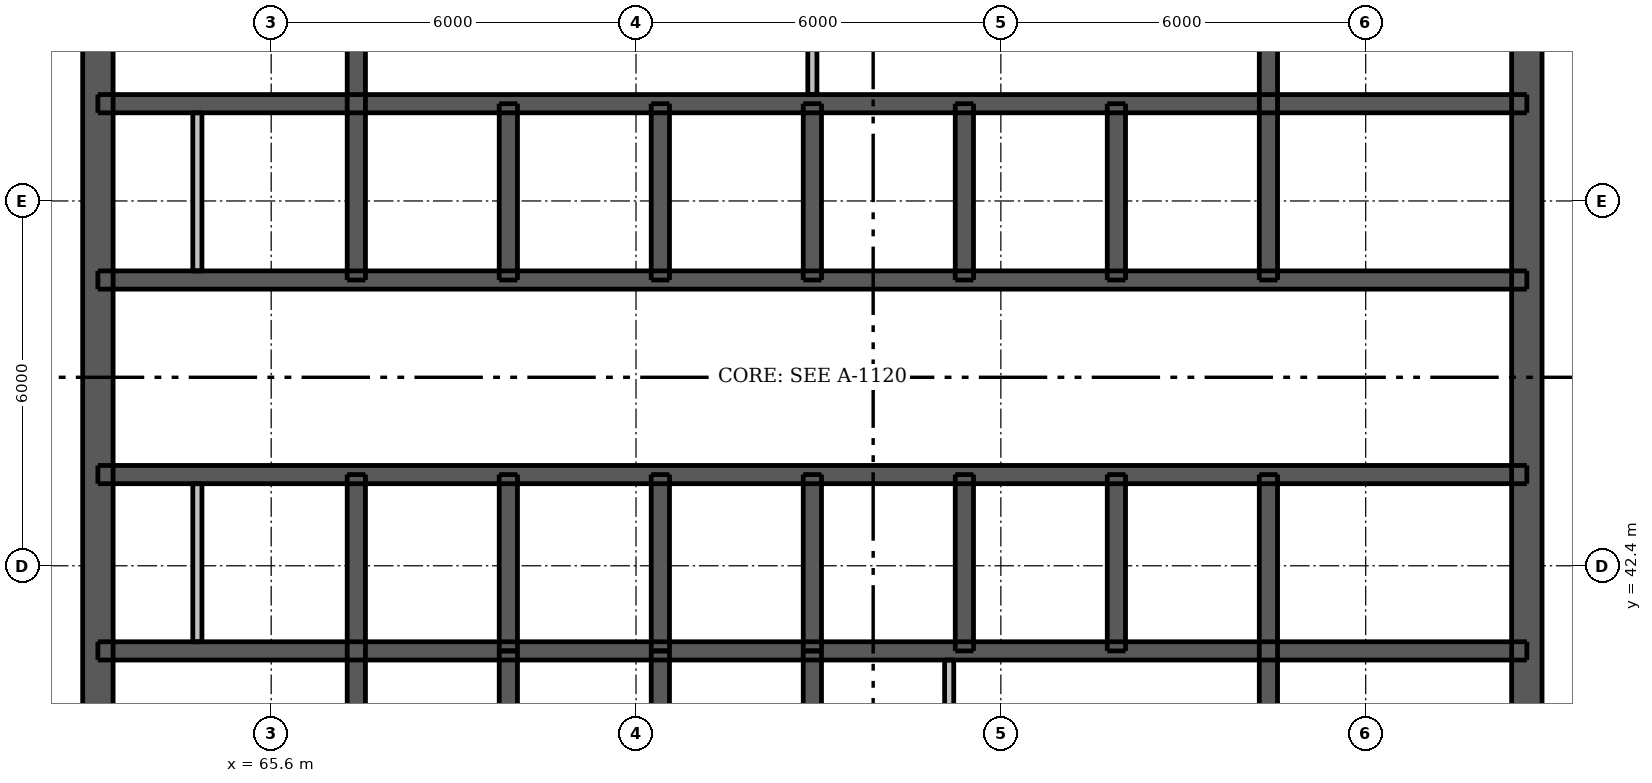
"""IFC4 building model, lengths in metres.
Left out: names, types, materials, properties, quantities, classifications, styles, units other than length and angle.
Written with IfcOpenShell. Run it as: python <this file> out.ifc"""

import sys

from ifc_helpers import new_model, si_unit, direction, frame, frame_2d, origin, place, context, subcontext, project, spatial, rectangle, extrude, element, fill, save


model = new_model("IFC4")
c1 = context("Model", 3, precision=1e-05, world=origin(), true_north=direction((0.0, 1.0)))
c2 = subcontext(c1, "Body", "Model", "MODEL_VIEW")
j1 = project(units=[si_unit("LENGTHUNIT", "METRE"), si_unit("PLANEANGLEUNIT", "RADIAN")], contexts=[c1])
p1 = place(None, origin())
s1 = spatial("IfcSite", under=j1, at=p1, CompositionType="ELEMENT")
p2 = place(p1, origin())
s2 = spatial("IfcBuilding", under=s1, at=p2, CompositionType="ELEMENT")
p3 = place(p2, frame((0.0, 0.0, 275.2)))
s3 = spatial("IfcBuildingStorey", under=s2, at=p3, CompositionType="ELEMENT", Elevation=275.2)
p4 = place(p3, frame((62.75, 33.5, 0.0), z_axis=(0.0, 0.0, 1.0), x_axis=(0.0, 1.0, 0.0)))
e1 = element("IfcWall", 1, at=p4, inside=s3, PredefinedType="SHEAR", context=c2, shape_type="SweptSolid", body=[
    extrude(rectangle(XDim=24.0, YDim=0.5, at=frame_2d((12.0, 0.0))), origin(), (0.0, 0.0, 1.0), 3.05),
])
p5 = place(p4, frame((11.2, 0.0, 0.0)))
e2 = element("IfcOpeningElement", 2, at=p5, cuts=e1, PredefinedType="OPENING", context=c2, shape_type="SweptSolid", body=[
    extrude(rectangle(XDim=1.6, YDim=2.1, at=frame_2d((0.8, 1.05))), frame((0.0, 0.26, 0.0), z_axis=(0.0, -1.0, 0.0), x_axis=(1.0, 0.0, 0.0)), (0.0, 0.0, 1.0), 0.52),
])
p6 = place(p3, frame((86.25, 33.5, 0.0), z_axis=(0.0, 0.0, 1.0), x_axis=(0.0, 1.0, 0.0)))
e3 = element("IfcWall", 3, at=p6, inside=s3, PredefinedType="SHEAR", context=c2, shape_type="SweptSolid", body=[
    extrude(rectangle(XDim=24.0, YDim=0.5, at=frame_2d((12.0, 0.0))), origin(), (0.0, 0.0, 1.0), 3.05),
])
p7 = place(p6, frame((11.2, 0.0, 0.0)))
e4 = element("IfcOpeningElement", 4, at=p7, cuts=e3, PredefinedType="OPENING", context=c2, shape_type="SweptSolid", body=[
    extrude(rectangle(XDim=1.6, YDim=2.1, at=frame_2d((0.8, 1.05))), frame((0.0, 0.26, 0.0), z_axis=(0.0, -1.0, 0.0), x_axis=(1.0, 0.0, 0.0)), (0.0, 0.0, 1.0), 0.52),
])
p8 = place(p3, frame((62.75, 41.0, 0.0), z_axis=(0.0, 0.0, 1.0), x_axis=(1.0, 0.0, 0.0)))
e5 = element("IfcWall", 5, at=p8, inside=s3, PredefinedType="SHEAR", context=c2, shape_type="SweptSolid", body=[
    extrude(rectangle(XDim=23.5, YDim=0.3, at=frame_2d((11.75, 0.0))), origin(), (0.0, 0.0, 1.0), 3.05),
])
p9 = place(p3, frame((62.75, 43.9, 0.0), z_axis=(0.0, 0.0, 1.0), x_axis=(1.0, 0.0, 0.0)))
e6 = element("IfcWall", 6, at=p9, inside=s3, PredefinedType="SHEAR", context=c2, shape_type="SweptSolid", body=[
    extrude(rectangle(XDim=23.5, YDim=0.3, at=frame_2d((11.75, 0.0))), origin(), (0.0, 0.0, 1.0), 3.05),
])
p10 = place(p9, frame((0.543, 0.0, 0.0)))
e7 = element("IfcOpeningElement", 7, at=p10, cuts=e6, PredefinedType="OPENING", context=c2, shape_type="SweptSolid", body=[
    extrude(rectangle(XDim=0.8, YDim=2.1, at=frame_2d((0.4, 1.05))), frame((0.0, 0.16, 0.0), z_axis=(0.0, -1.0, 0.0), x_axis=(1.0, 0.0, 0.0)), (0.0, 0.0, 1.0), 0.32),
])
p11 = place(p9, frame((2.418, 0.0, 0.0)))
e8 = element("IfcOpeningElement", 8, at=p11, cuts=e6, PredefinedType="OPENING", context=c2, shape_type="SweptSolid", body=[
    extrude(rectangle(XDim=0.9, YDim=2.1, at=frame_2d((0.45, 1.05))), frame((0.0, 0.16, 0.0), z_axis=(0.0, -1.0, 0.0), x_axis=(1.0, 0.0, 0.0)), (0.0, 0.0, 1.0), 0.32),
])
p12 = place(p9, frame((20.875, 0.0, 0.0)))
e9 = element("IfcOpeningElement", 9, at=p12, cuts=e6, PredefinedType="OPENING", context=c2, shape_type="SweptSolid", body=[
    extrude(rectangle(XDim=0.9, YDim=2.1, at=frame_2d((0.45, 1.05))), frame((0.0, 0.16, 0.0), z_axis=(0.0, -1.0, 0.0), x_axis=(1.0, 0.0, 0.0)), (0.0, 0.0, 1.0), 0.32),
])
p13 = place(p9, frame((5.05, 0.0, 0.0)))
e10 = element("IfcOpeningElement", 10, at=p13, cuts=e6, PredefinedType="OPENING", context=c2, shape_type="SweptSolid", body=[
    extrude(rectangle(XDim=0.9, YDim=2.1, at=frame_2d((0.45, 1.05))), frame((0.0, 0.16, 0.0), z_axis=(0.0, -1.0, 0.0), x_axis=(1.0, 0.0, 0.0)), (0.0, 0.0, 1.0), 0.32),
])
p14 = place(p9, frame((7.55, 0.0, 0.0)))
e11 = element("IfcOpeningElement", 11, at=p14, cuts=e6, PredefinedType="OPENING", context=c2, shape_type="SweptSolid", body=[
    extrude(rectangle(XDim=0.9, YDim=2.1, at=frame_2d((0.45, 1.05))), frame((0.0, 0.16, 0.0), z_axis=(0.0, -1.0, 0.0), x_axis=(1.0, 0.0, 0.0)), (0.0, 0.0, 1.0), 0.32),
])
p15 = place(p9, frame((12.55, 0.0, 0.0)))
e12 = element("IfcOpeningElement", 12, at=p15, cuts=e6, PredefinedType="OPENING", context=c2, shape_type="SweptSolid", body=[
    extrude(rectangle(XDim=0.9, YDim=2.1, at=frame_2d((0.45, 1.05))), frame((0.0, 0.16, 0.0), z_axis=(0.0, -1.0, 0.0), x_axis=(1.0, 0.0, 0.0)), (0.0, 0.0, 1.0), 0.32),
])
p16 = place(p9, frame((15.05, 0.0, 0.0)))
e13 = element("IfcOpeningElement", 13, at=p16, cuts=e6, PredefinedType="OPENING", context=c2, shape_type="SweptSolid", body=[
    extrude(rectangle(XDim=0.9, YDim=2.1, at=frame_2d((0.45, 1.05))), frame((0.0, 0.16, 0.0), z_axis=(0.0, -1.0, 0.0), x_axis=(1.0, 0.0, 0.0)), (0.0, 0.0, 1.0), 0.32),
])
p17 = place(p3, frame((62.75, 47.1, 0.0), z_axis=(0.0, 0.0, 1.0), x_axis=(1.0, 0.0, 0.0)))
e14 = element("IfcWall", 14, at=p17, inside=s3, PredefinedType="SHEAR", context=c2, shape_type="SweptSolid", body=[
    extrude(rectangle(XDim=23.5, YDim=0.3, at=frame_2d((11.75, 0.0))), origin(), (0.0, 0.0, 1.0), 3.05),
])
p18 = place(p17, frame((0.543, 0.0, 0.0)))
e15 = element("IfcOpeningElement", 15, at=p18, cuts=e14, PredefinedType="OPENING", context=c2, shape_type="SweptSolid", body=[
    extrude(rectangle(XDim=0.8, YDim=2.1, at=frame_2d((0.4, 1.05))), frame((0.0, 0.16, 0.0), z_axis=(0.0, -1.0, 0.0), x_axis=(1.0, 0.0, 0.0)), (0.0, 0.0, 1.0), 0.32),
])
p19 = place(p17, frame((2.418, 0.0, 0.0)))
e16 = element("IfcOpeningElement", 16, at=p19, cuts=e14, PredefinedType="OPENING", context=c2, shape_type="SweptSolid", body=[
    extrude(rectangle(XDim=0.9, YDim=2.1, at=frame_2d((0.45, 1.05))), frame((0.0, 0.16, 0.0), z_axis=(0.0, -1.0, 0.0), x_axis=(1.0, 0.0, 0.0)), (0.0, 0.0, 1.0), 0.32),
])
p20 = place(p17, frame((20.875, 0.0, 0.0)))
e17 = element("IfcOpeningElement", 17, at=p20, cuts=e14, PredefinedType="OPENING", context=c2, shape_type="SweptSolid", body=[
    extrude(rectangle(XDim=0.9, YDim=2.1, at=frame_2d((0.45, 1.05))), frame((0.0, 0.16, 0.0), z_axis=(0.0, -1.0, 0.0), x_axis=(1.0, 0.0, 0.0)), (0.0, 0.0, 1.0), 0.32),
])
p21 = place(p17, frame((4.95, 0.0, 0.0)))
e18 = element("IfcOpeningElement", 18, at=p21, cuts=e14, PredefinedType="OPENING", context=c2, shape_type="SweptSolid", body=[
    extrude(rectangle(XDim=1.1, YDim=2.1, at=frame_2d((0.55, 1.05))), frame((0.0, 0.16, 0.0), z_axis=(0.0, -1.0, 0.0), x_axis=(1.0, 0.0, 0.0)), (0.0, 0.0, 1.0), 0.32),
])
p22 = place(p17, frame((7.45, 0.0, 0.0)))
e19 = element("IfcOpeningElement", 19, at=p22, cuts=e14, PredefinedType="OPENING", context=c2, shape_type="SweptSolid", body=[
    extrude(rectangle(XDim=1.1, YDim=2.1, at=frame_2d((0.55, 1.05))), frame((0.0, 0.16, 0.0), z_axis=(0.0, -1.0, 0.0), x_axis=(1.0, 0.0, 0.0)), (0.0, 0.0, 1.0), 0.32),
])
p23 = place(p17, frame((9.95, 0.0, 0.0)))
e20 = element("IfcOpeningElement", 20, at=p23, cuts=e14, PredefinedType="OPENING", context=c2, shape_type="SweptSolid", body=[
    extrude(rectangle(XDim=1.1, YDim=2.1, at=frame_2d((0.55, 1.05))), frame((0.0, 0.16, 0.0), z_axis=(0.0, -1.0, 0.0), x_axis=(1.0, 0.0, 0.0)), (0.0, 0.0, 1.0), 0.32),
])
p24 = place(p17, frame((12.45, 0.0, 0.0)))
e21 = element("IfcOpeningElement", 21, at=p24, cuts=e14, PredefinedType="OPENING", context=c2, shape_type="SweptSolid", body=[
    extrude(rectangle(XDim=1.1, YDim=2.1, at=frame_2d((0.55, 1.05))), frame((0.0, 0.16, 0.0), z_axis=(0.0, -1.0, 0.0), x_axis=(1.0, 0.0, 0.0)), (0.0, 0.0, 1.0), 0.32),
])
p25 = place(p17, frame((14.95, 0.0, 0.0)))
e22 = element("IfcOpeningElement", 22, at=p25, cuts=e14, PredefinedType="OPENING", context=c2, shape_type="SweptSolid", body=[
    extrude(rectangle(XDim=1.1, YDim=2.1, at=frame_2d((0.55, 1.05))), frame((0.0, 0.16, 0.0), z_axis=(0.0, -1.0, 0.0), x_axis=(1.0, 0.0, 0.0)), (0.0, 0.0, 1.0), 0.32),
])
p26 = place(p17, frame((17.45, 0.0, 0.0)))
e23 = element("IfcOpeningElement", 23, at=p26, cuts=e14, PredefinedType="OPENING", context=c2, shape_type="SweptSolid", body=[
    extrude(rectangle(XDim=1.1, YDim=2.1, at=frame_2d((0.55, 1.05))), frame((0.0, 0.16, 0.0), z_axis=(0.0, -1.0, 0.0), x_axis=(1.0, 0.0, 0.0)), (0.0, 0.0, 1.0), 0.32),
])
p27 = place(p3, frame((62.75, 50.0, 0.0), z_axis=(0.0, 0.0, 1.0), x_axis=(1.0, 0.0, 0.0)))
e24 = element("IfcWall", 24, at=p27, inside=s3, PredefinedType="SHEAR", context=c2, shape_type="SweptSolid", body=[
    extrude(rectangle(XDim=23.5, YDim=0.3, at=frame_2d((11.75, 0.0))), origin(), (0.0, 0.0, 1.0), 3.05),
])
p28 = place(p3, frame((67.0, 33.75, 0.0), z_axis=(0.0, 0.0, 1.0), x_axis=(0.0, 1.0, 0.0)))
e25 = element("IfcWall", 25, at=p28, inside=s3, PredefinedType="SHEAR", context=c2, shape_type="SweptSolid", body=[
    extrude(rectangle(XDim=10.15, YDim=0.3, at=frame_2d((5.075, 0.0))), origin(), (0.0, 0.0, 1.0), 3.05),
])
p29 = place(p28, frame((0.45, 0.0, 0.0)))
e26 = element("IfcOpeningElement", 26, at=p29, cuts=e25, PredefinedType="OPENING", context=c2, shape_type="SweptSolid", body=[
    extrude(rectangle(XDim=1.1, YDim=2.1, at=frame_2d((0.55, 1.05))), frame((0.0, 0.16, 0.0), z_axis=(0.0, -1.0, 0.0), x_axis=(1.0, 0.0, 0.0)), (0.0, 0.0, 1.0), 0.32),
])
for number, where, z_axis, x_axis in (
    (27, (67.0, 47.1, 0.0), (0.0, 0.0, 1.0), (0.0, 1.0, 0.0)),
    (28, (82.0, 33.75, 0.0), (0.0, 0.0, 1.0), (0.0, 1.0, 0.0)),
    (29, (82.0, 47.1, 0.0), (0.0, 0.0, 1.0), (0.0, 1.0, 0.0)),
):
    element("IfcWall", number, at=place(p3, frame(where, z_axis=z_axis, x_axis=x_axis)), inside=s3, PredefinedType="SHEAR", context=c2, shape_type="SweptSolid", body=[
        extrude(rectangle(XDim=10.15, YDim=0.3, at=frame_2d((5.075, 0.0))), origin(), (0.0, 0.0, 1.0), 3.05),
    ])
for number, where, z_axis, x_axis in (
    (30, (69.5, 41.0, 0.0), (0.0, 0.0, 1.0), (0.0, 1.0, 0.0)),
    (31, (69.5, 47.1, 0.0), (0.0, 0.0, 1.0), (0.0, 1.0, 0.0)),
    (32, (72.0, 41.0, 0.0), (0.0, 0.0, 1.0), (0.0, 1.0, 0.0)),
    (33, (72.0, 47.1, 0.0), (0.0, 0.0, 1.0), (0.0, 1.0, 0.0)),
    (34, (74.5, 41.0, 0.0), (0.0, 0.0, 1.0), (0.0, 1.0, 0.0)),
    (35, (74.5, 47.1, 0.0), (0.0, 0.0, 1.0), (0.0, 1.0, 0.0)),
    (36, (77.0, 41.0, 0.0), (0.0, 0.0, 1.0), (0.0, 1.0, 0.0)),
    (37, (77.0, 47.1, 0.0), (0.0, 0.0, 1.0), (0.0, 1.0, 0.0)),
    (38, (79.5, 41.0, 0.0), (0.0, 0.0, 1.0), (0.0, 1.0, 0.0)),
    (39, (79.5, 47.1, 0.0), (0.0, 0.0, 1.0), (0.0, 1.0, 0.0)),
    (40, (69.5, 38.1, 0.0), (0.0, 0.0, 1.0), (0.0, 1.0, 0.0)),
    (41, (72.0, 38.1, 0.0), (0.0, 0.0, 1.0), (0.0, 1.0, 0.0)),
    (42, (74.5, 38.1, 0.0), (0.0, 0.0, 1.0), (0.0, 1.0, 0.0)),
):
    element("IfcWall", number, at=place(p3, frame(where, z_axis=z_axis, x_axis=x_axis)), inside=s3, PredefinedType="SHEAR", context=c2, shape_type="SweptSolid", body=[
        extrude(rectangle(XDim=2.9, YDim=0.3, at=frame_2d((1.45, 0.0))), origin(), (0.0, 0.0, 1.0), 3.05),
    ])
p30 = place(p3, frame((76.75, 34.0, 0.0), z_axis=(0.0, 0.0, 1.0), x_axis=(0.0, 1.0, 0.0)))
e43 = element("IfcWall", 43, at=p30, inside=s3, PredefinedType="PLUMBINGWALL", context=c2, shape_type="SweptSolid", body=[
    extrude(rectangle(XDim=6.85, YDim=0.15, at=frame_2d((3.425, 0.0))), origin(), (0.0, 0.0, 1.0), 3.05),
])
for number, where, z_axis, x_axis in (
    (44, (64.386, 41.15, 0.0), (0.0, 0.0, 1.0), (0.0, 1.0, 0.0)),
    (45, (64.386, 47.25, 0.0), (0.0, 0.0, 1.0), (0.0, 1.0, 0.0)),
):
    element("IfcWall", number, at=place(p3, frame(where, z_axis=z_axis, x_axis=x_axis)), inside=s3, PredefinedType="PLUMBINGWALL", context=c2, shape_type="SweptSolid", body=[
        extrude(rectangle(XDim=2.6, YDim=0.15, at=frame_2d((1.3, 0.0))), origin(), (0.0, 0.0, 1.0), 3.05),
    ])
p31 = place(p3, frame((74.5, 50.15, 0.0), z_axis=(0.0, 0.0, 1.0), x_axis=(0.0, 1.0, 0.0)))
e46 = element("IfcWall", 46, at=p31, inside=s3, PredefinedType="PLUMBINGWALL", context=c2, shape_type="SweptSolid", body=[
    extrude(rectangle(XDim=6.85, YDim=0.15, at=frame_2d((3.425, 0.0))), origin(), (0.0, 0.0, 1.0), 3.05),
])
p32 = place(p5, origin())
e47 = element("IfcDoor", 47, at=p32, inside=s3, OperationType="DOUBLE_DOOR_SINGLE_SWING", PredefinedType="DOOR", context=c2, shape_type="SweptSolid", body=[
    extrude(rectangle(XDim=1.6, YDim=2.1, at=frame_2d((0.8, 1.05))), frame((0.0, -0.188, 0.0), z_axis=(0.0, -1.0, 0.0), x_axis=(1.0, 0.0, 0.0)), (0.0, 0.0, 1.0), 0.05),
])
fill(e2, e47)
p33 = place(p7, origin())
e48 = element("IfcDoor", 48, at=p33, inside=s3, OperationType="DOUBLE_DOOR_SINGLE_SWING", PredefinedType="DOOR", context=c2, shape_type="SweptSolid", body=[
    extrude(rectangle(XDim=1.6, YDim=2.1, at=frame_2d((0.8, 1.05))), frame((0.0, 0.237, 0.0), z_axis=(0.0, -1.0, 0.0), x_axis=(1.0, 0.0, 0.0)), (0.0, 0.0, 1.0), 0.05),
])
fill(e4, e48)
p34 = place(p10, origin())
e49 = element("IfcDoor", 49, at=p34, inside=s3, OperationType="SINGLE_SWING_LEFT", PredefinedType="DOOR", context=c2, shape_type="SweptSolid", body=[
    extrude(rectangle(XDim=0.8, YDim=2.1, at=frame_2d((0.4, 1.05))), frame((0.0, -0.087, 0.0), z_axis=(0.0, -1.0, 0.0), x_axis=(1.0, 0.0, 0.0)), (0.0, 0.0, 1.0), 0.05),
])
fill(e7, e49)
p35 = place(p11, origin())
e50 = element("IfcDoor", 50, at=p35, inside=s3, OperationType="SINGLE_SWING_RIGHT", PredefinedType="DOOR", context=c2, shape_type="SweptSolid", body=[
    extrude(rectangle(XDim=0.9, YDim=2.1, at=frame_2d((0.45, 1.05))), frame((0.0, -0.087, 0.0), z_axis=(0.0, -1.0, 0.0), x_axis=(1.0, 0.0, 0.0)), (0.0, 0.0, 1.0), 0.05),
])
fill(e8, e50)
p36 = place(p12, origin())
e51 = element("IfcDoor", 51, at=p36, inside=s3, OperationType="SINGLE_SWING_LEFT", PredefinedType="DOOR", context=c2, shape_type="SweptSolid", body=[
    extrude(rectangle(XDim=0.9, YDim=2.1, at=frame_2d((0.45, 1.05))), frame((0.0, -0.087, 0.0), z_axis=(0.0, -1.0, 0.0), x_axis=(1.0, 0.0, 0.0)), (0.0, 0.0, 1.0), 0.05),
])
fill(e9, e51)
p37 = place(p18, origin())
e52 = element("IfcDoor", 52, at=p37, inside=s3, OperationType="SINGLE_SWING_LEFT", PredefinedType="DOOR", context=c2, shape_type="SweptSolid", body=[
    extrude(rectangle(XDim=0.8, YDim=2.1, at=frame_2d((0.4, 1.05))), frame((0.0, 0.138, 0.0), z_axis=(0.0, -1.0, 0.0), x_axis=(1.0, 0.0, 0.0)), (0.0, 0.0, 1.0), 0.05),
])
fill(e15, e52)
p38 = place(p19, origin())
e53 = element("IfcDoor", 53, at=p38, inside=s3, OperationType="SINGLE_SWING_RIGHT", PredefinedType="DOOR", context=c2, shape_type="SweptSolid", body=[
    extrude(rectangle(XDim=0.9, YDim=2.1, at=frame_2d((0.45, 1.05))), frame((0.0, 0.138, 0.0), z_axis=(0.0, -1.0, 0.0), x_axis=(1.0, 0.0, 0.0)), (0.0, 0.0, 1.0), 0.05),
])
fill(e16, e53)
p39 = place(p20, origin())
e54 = element("IfcDoor", 54, at=p39, inside=s3, OperationType="SINGLE_SWING_LEFT", PredefinedType="DOOR", context=c2, shape_type="SweptSolid", body=[
    extrude(rectangle(XDim=0.9, YDim=2.1, at=frame_2d((0.45, 1.05))), frame((0.0, 0.138, 0.0), z_axis=(0.0, -1.0, 0.0), x_axis=(1.0, 0.0, 0.0)), (0.0, 0.0, 1.0), 0.05),
])
fill(e17, e54)
p40 = place(p13, origin())
e55 = element("IfcDoor", 55, at=p40, inside=s3, OperationType="SINGLE_SWING_RIGHT", PredefinedType="DOOR", context=c2, shape_type="SweptSolid", body=[
    extrude(rectangle(XDim=0.9, YDim=2.1, at=frame_2d((0.45, 1.05))), frame((0.0, -0.087, 0.0), z_axis=(0.0, -1.0, 0.0), x_axis=(1.0, 0.0, 0.0)), (0.0, 0.0, 1.0), 0.05),
])
fill(e10, e55)
p41 = place(p14, origin())
e56 = element("IfcDoor", 56, at=p41, inside=s3, OperationType="SINGLE_SWING_LEFT", PredefinedType="DOOR", context=c2, shape_type="SweptSolid", body=[
    extrude(rectangle(XDim=0.9, YDim=2.1, at=frame_2d((0.45, 1.05))), frame((0.0, -0.087, 0.0), z_axis=(0.0, -1.0, 0.0), x_axis=(1.0, 0.0, 0.0)), (0.0, 0.0, 1.0), 0.05),
])
fill(e11, e56)
p42 = place(p15, origin())
e57 = element("IfcDoor", 57, at=p42, inside=s3, OperationType="SINGLE_SWING_LEFT", PredefinedType="DOOR", context=c2, shape_type="SweptSolid", body=[
    extrude(rectangle(XDim=0.9, YDim=2.1, at=frame_2d((0.45, 1.05))), frame((0.0, -0.087, 0.0), z_axis=(0.0, -1.0, 0.0), x_axis=(1.0, 0.0, 0.0)), (0.0, 0.0, 1.0), 0.05),
])
fill(e12, e57)
p43 = place(p16, origin())
e58 = element("IfcDoor", 58, at=p43, inside=s3, OperationType="SINGLE_SWING_RIGHT", PredefinedType="DOOR", context=c2, shape_type="SweptSolid", body=[
    extrude(rectangle(XDim=0.9, YDim=2.1, at=frame_2d((0.45, 1.05))), frame((0.0, -0.087, 0.0), z_axis=(0.0, -1.0, 0.0), x_axis=(1.0, 0.0, 0.0)), (0.0, 0.0, 1.0), 0.05),
])
fill(e13, e58)
p44 = place(p21, origin())
e59 = element("IfcDoor", 59, at=p44, inside=s3, OperationType="DOUBLE_DOOR_SLIDING", PredefinedType="DOOR", context=c2, shape_type="SweptSolid", body=[
    extrude(rectangle(XDim=1.1, YDim=2.1, at=frame_2d((0.55, 1.05))), frame((0.0, 0.025, 0.0), z_axis=(0.0, -1.0, 0.0), x_axis=(1.0, 0.0, 0.0)), (0.0, 0.0, 1.0), 0.05),
])
fill(e18, e59)
p45 = place(p22, origin())
e60 = element("IfcDoor", 60, at=p45, inside=s3, OperationType="DOUBLE_DOOR_SLIDING", PredefinedType="DOOR", context=c2, shape_type="SweptSolid", body=[
    extrude(rectangle(XDim=1.1, YDim=2.1, at=frame_2d((0.55, 1.05))), frame((0.0, 0.025, 0.0), z_axis=(0.0, -1.0, 0.0), x_axis=(1.0, 0.0, 0.0)), (0.0, 0.0, 1.0), 0.05),
])
fill(e19, e60)
p46 = place(p23, origin())
e61 = element("IfcDoor", 61, at=p46, inside=s3, OperationType="DOUBLE_DOOR_SLIDING", PredefinedType="DOOR", context=c2, shape_type="SweptSolid", body=[
    extrude(rectangle(XDim=1.1, YDim=2.1, at=frame_2d((0.55, 1.05))), frame((0.0, 0.025, 0.0), z_axis=(0.0, -1.0, 0.0), x_axis=(1.0, 0.0, 0.0)), (0.0, 0.0, 1.0), 0.05),
])
fill(e20, e61)
p47 = place(p24, origin())
e62 = element("IfcDoor", 62, at=p47, inside=s3, OperationType="DOUBLE_DOOR_SLIDING", PredefinedType="DOOR", context=c2, shape_type="SweptSolid", body=[
    extrude(rectangle(XDim=1.1, YDim=2.1, at=frame_2d((0.55, 1.05))), frame((0.0, 0.025, 0.0), z_axis=(0.0, -1.0, 0.0), x_axis=(1.0, 0.0, 0.0)), (0.0, 0.0, 1.0), 0.05),
])
fill(e21, e62)
p48 = place(p25, origin())
e63 = element("IfcDoor", 63, at=p48, inside=s3, OperationType="DOUBLE_DOOR_SLIDING", PredefinedType="DOOR", context=c2, shape_type="SweptSolid", body=[
    extrude(rectangle(XDim=1.1, YDim=2.1, at=frame_2d((0.55, 1.05))), frame((0.0, 0.025, 0.0), z_axis=(0.0, -1.0, 0.0), x_axis=(1.0, 0.0, 0.0)), (0.0, 0.0, 1.0), 0.05),
])
fill(e22, e63)
p49 = place(p26, origin())
e64 = element("IfcDoor", 64, at=p49, inside=s3, OperationType="DOUBLE_DOOR_SLIDING", PredefinedType="DOOR", context=c2, shape_type="SweptSolid", body=[
    extrude(rectangle(XDim=1.1, YDim=2.1, at=frame_2d((0.55, 1.05))), frame((0.0, 0.025, 0.0), z_axis=(0.0, -1.0, 0.0), x_axis=(1.0, 0.0, 0.0)), (0.0, 0.0, 1.0), 0.05),
])
fill(e23, e64)
save(model, sys.argv[1])
